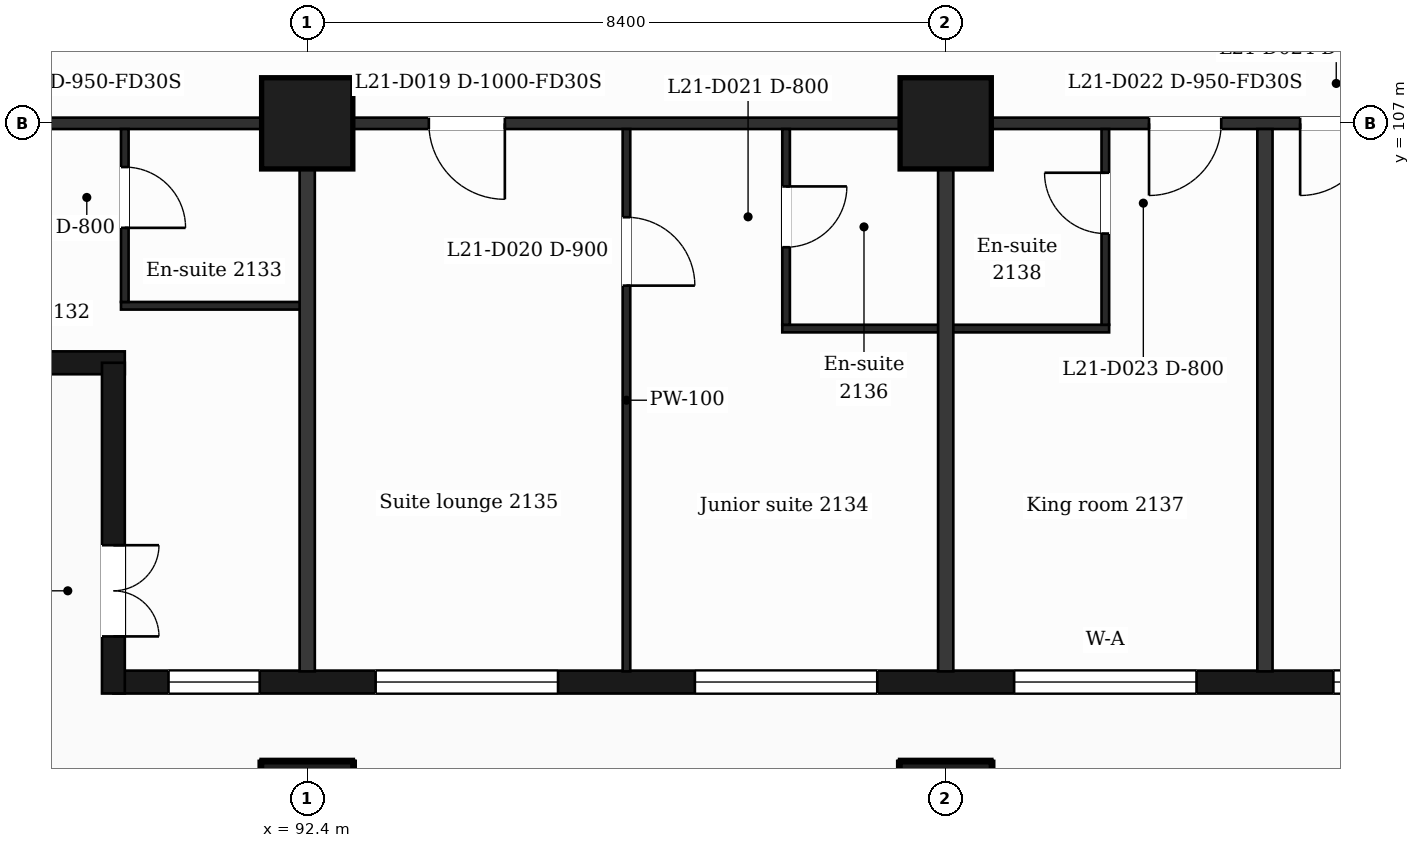
"""IFC4 building model, lengths in metres.
Left out: names, types, materials, properties, quantities, classifications, styles, units other than length and angle.
Written with IfcOpenShell. Run it as: python <this file> out.ifc"""

import sys

from ifc_helpers import new_model, si_unit, direction, frame, frame_2d, origin, origin_2d, place, context, subcontext, project, spatial, rectangle, extrude, element, fill, save


model = new_model("IFC4")
c1 = context("Model", 3, precision=1e-05, world=origin(), true_north=direction((0.0, 1.0)))
c2 = subcontext(c1, "Body", "Model", "MODEL_VIEW")
j1 = project(units=[si_unit("LENGTHUNIT", "METRE"), si_unit("PLANEANGLEUNIT", "RADIAN")], contexts=[c1])
p1 = place(None, origin())
s1 = spatial("IfcSite", under=j1, at=p1, CompositionType="ELEMENT")
p2 = place(p1, origin())
s2 = spatial("IfcBuilding", under=s1, at=p2, CompositionType="ELEMENT")
p3 = place(p2, frame((0.0, 0.0, 94.7)))
s3 = spatial("IfcBuildingStorey", under=s2, at=p3, CompositionType="ELEMENT", Elevation=94.7)
for number, where, z_axis, x_axis in (
    (1, (92.4, 98.0, 0.0), (0.0, 0.0, 1.0), (1.0, 0.0, 0.0)),
    (2, (100.8, 98.0, 0.0), (0.0, 0.0, 1.0), (1.0, 0.0, 0.0)),
    (3, (92.4, 107.0, 0.0), (0.0, 0.0, 1.0), (1.0, 0.0, 0.0)),
    (4, (100.8, 107.0, 0.0), (0.0, 0.0, 1.0), (1.0, 0.0, 0.0)),
):
    element("IfcColumn", number, at=place(p3, frame(where, z_axis=z_axis, x_axis=x_axis)), inside=s3, PredefinedType="COLUMN", context=c2, shape_type="SweptSolid", body=[
        extrude(rectangle(XDim=1.2, YDim=1.2, at=origin_2d()), origin(), (0.0, 0.0, 1.0), 3.7),
    ])
p4 = place(p3, frame((89.85, 99.65, 0.0), z_axis=(0.0, 0.0, 1.0), x_axis=(1.0, 0.0, 0.0)))
e5 = element("IfcWall", 5, at=p4, inside=s3, PredefinedType="SOLIDWALL", context=c2, shape_type="SweptSolid", body=[
    extrude(rectangle(XDim=47.25, YDim=0.3, at=frame_2d((23.625, 0.0))), origin(), (0.0, 0.0, 1.0), 3.38),
])
p5 = place(p4, frame((0.725, 0.0, 0.9)))
e6 = element("IfcOpeningElement", 6, at=p5, cuts=e5, PredefinedType="OPENING", context=c2, shape_type="SweptSolid", body=[
    extrude(rectangle(XDim=1.2, YDim=2.1, at=frame_2d((0.6, 1.05))), frame((0.0, 0.16, 0.0), z_axis=(0.0, -1.0, 0.0), x_axis=(1.0, 0.0, 0.0)), (0.0, 0.0, 1.0), 0.32),
])
p6 = place(p4, frame((3.45, 0.0, 0.9)))
e7 = element("IfcOpeningElement", 7, at=p6, cuts=e5, PredefinedType="OPENING", context=c2, shape_type="SweptSolid", body=[
    extrude(rectangle(XDim=2.4, YDim=2.1, at=frame_2d((1.2, 1.05))), frame((0.0, 0.16, 0.0), z_axis=(0.0, -1.0, 0.0), x_axis=(1.0, 0.0, 0.0)), (0.0, 0.0, 1.0), 0.32),
])
p7 = place(p4, frame((7.65, 0.0, 0.9)))
e8 = element("IfcOpeningElement", 8, at=p7, cuts=e5, PredefinedType="OPENING", context=c2, shape_type="SweptSolid", body=[
    extrude(rectangle(XDim=2.4, YDim=2.1, at=frame_2d((1.2, 1.05))), frame((0.0, 0.16, 0.0), z_axis=(0.0, -1.0, 0.0), x_axis=(1.0, 0.0, 0.0)), (0.0, 0.0, 1.0), 0.32),
])
p8 = place(p4, frame((11.85, 0.0, 0.9)))
e9 = element("IfcOpeningElement", 9, at=p8, cuts=e5, PredefinedType="OPENING", context=c2, shape_type="SweptSolid", body=[
    extrude(rectangle(XDim=2.4, YDim=2.1, at=frame_2d((1.2, 1.05))), frame((0.0, 0.16, 0.0), z_axis=(0.0, -1.0, 0.0), x_axis=(1.0, 0.0, 0.0)), (0.0, 0.0, 1.0), 0.32),
])
p9 = place(p4, frame((16.05, 0.0, 0.9)))
e10 = element("IfcOpeningElement", 10, at=p9, cuts=e5, PredefinedType="OPENING", context=c2, shape_type="SweptSolid", body=[
    extrude(rectangle(XDim=2.4, YDim=2.1, at=frame_2d((1.2, 1.05))), frame((0.0, 0.16, 0.0), z_axis=(0.0, -1.0, 0.0), x_axis=(1.0, 0.0, 0.0)), (0.0, 0.0, 1.0), 0.32),
])
p10 = place(p4, frame((20.25, 0.0, 0.9)))
e11 = element("IfcOpeningElement", 11, at=p10, cuts=e5, PredefinedType="OPENING", context=c2, shape_type="SweptSolid", body=[
    extrude(rectangle(XDim=2.4, YDim=2.1, at=frame_2d((1.2, 1.05))), frame((0.0, 0.16, 0.0), z_axis=(0.0, -1.0, 0.0), x_axis=(1.0, 0.0, 0.0)), (0.0, 0.0, 1.0), 0.32),
])
p11 = place(p4, frame((25.05, 0.0, 0.9)))
e12 = element("IfcOpeningElement", 12, at=p11, cuts=e5, PredefinedType="OPENING", context=c2, shape_type="SweptSolid", body=[
    extrude(rectangle(XDim=1.2, YDim=2.1, at=frame_2d((0.6, 1.05))), frame((0.0, 0.16, 0.0), z_axis=(0.0, -1.0, 0.0), x_axis=(1.0, 0.0, 0.0)), (0.0, 0.0, 1.0), 0.32),
])
p12 = place(p4, frame((29.25, 0.0, 0.9)))
e13 = element("IfcOpeningElement", 13, at=p12, cuts=e5, PredefinedType="OPENING", context=c2, shape_type="SweptSolid", body=[
    extrude(rectangle(XDim=1.2, YDim=2.1, at=frame_2d((0.6, 1.05))), frame((0.0, 0.16, 0.0), z_axis=(0.0, -1.0, 0.0), x_axis=(1.0, 0.0, 0.0)), (0.0, 0.0, 1.0), 0.32),
])
p13 = place(p4, frame((32.55, 0.0, 0.0)))
e14 = element("IfcOpeningElement", 14, at=p13, cuts=e5, PredefinedType="OPENING", context=c2, shape_type="SweptSolid", body=[
    extrude(rectangle(XDim=1.2, YDim=2.4, at=frame_2d((0.6, 1.2))), frame((0.0, 0.16, 0.0), z_axis=(0.0, -1.0, 0.0), x_axis=(1.0, 0.0, 0.0)), (0.0, 0.0, 1.0), 0.32),
])
p14 = place(p4, frame((34.35, 0.0, 0.9)))
e15 = element("IfcOpeningElement", 15, at=p14, cuts=e5, PredefinedType="OPENING", context=c2, shape_type="SweptSolid", body=[
    extrude(rectangle(XDim=1.2, YDim=2.1, at=frame_2d((0.6, 1.05))), frame((0.0, 0.16, 0.0), z_axis=(0.0, -1.0, 0.0), x_axis=(1.0, 0.0, 0.0)), (0.0, 0.0, 1.0), 0.32),
])
p15 = place(p4, frame((37.05, 0.0, 0.9)))
e16 = element("IfcOpeningElement", 16, at=p15, cuts=e5, PredefinedType="OPENING", context=c2, shape_type="SweptSolid", body=[
    extrude(rectangle(XDim=2.4, YDim=2.1, at=frame_2d((1.2, 1.05))), frame((0.0, 0.16, 0.0), z_axis=(0.0, -1.0, 0.0), x_axis=(1.0, 0.0, 0.0)), (0.0, 0.0, 1.0), 0.32),
])
p16 = place(p4, frame((40.95, 0.0, 0.0)))
e17 = element("IfcOpeningElement", 17, at=p16, cuts=e5, PredefinedType="OPENING", context=c2, shape_type="SweptSolid", body=[
    extrude(rectangle(XDim=1.2, YDim=2.4, at=frame_2d((0.6, 1.2))), frame((0.0, 0.16, 0.0), z_axis=(0.0, -1.0, 0.0), x_axis=(1.0, 0.0, 0.0)), (0.0, 0.0, 1.0), 0.32),
])
p17 = place(p4, frame((42.75, 0.0, 0.9)))
e18 = element("IfcOpeningElement", 18, at=p17, cuts=e5, PredefinedType="OPENING", context=c2, shape_type="SweptSolid", body=[
    extrude(rectangle(XDim=1.2, YDim=2.1, at=frame_2d((0.6, 1.05))), frame((0.0, 0.16, 0.0), z_axis=(0.0, -1.0, 0.0), x_axis=(1.0, 0.0, 0.0)), (0.0, 0.0, 1.0), 0.32),
])
p18 = place(p4, frame((45.25, 0.0, 0.9)))
e19 = element("IfcOpeningElement", 19, at=p18, cuts=e5, PredefinedType="OPENING", context=c2, shape_type="SweptSolid", body=[
    extrude(rectangle(XDim=1.2, YDim=2.1, at=frame_2d((0.6, 1.05))), frame((0.0, 0.16, 0.0), z_axis=(0.0, -1.0, 0.0), x_axis=(1.0, 0.0, 0.0)), (0.0, 0.0, 1.0), 0.32),
])
p19 = place(p3, frame((86.452, 103.85, 0.0), z_axis=(0.0, 0.0, 1.0), x_axis=(1.0, 0.0, 0.0)))
e20 = element("IfcWall", 20, at=p19, inside=s3, PredefinedType="SOLIDWALL", context=c2, shape_type="SweptSolid", body=[
    extrude(rectangle(XDim=3.548, YDim=0.3, at=frame_2d((1.774, 0.0))), origin(), (0.0, 0.0, 1.0), 3.38),
])
p20 = place(p3, frame((89.85, 103.85, 0.0), z_axis=(0.0, 0.0, 1.0), x_axis=(0.0, -1.0, 0.0)))
e21 = element("IfcWall", 21, at=p20, inside=s3, PredefinedType="SOLIDWALL", context=c2, shape_type="SweptSolid", body=[
    extrude(rectangle(XDim=4.35, YDim=0.3, at=frame_2d((2.175, 0.0))), origin(), (0.0, 0.0, 1.0), 3.38),
])
p21 = place(p20, frame((2.4, 0.0, 0.0)))
e22 = element("IfcOpeningElement", 22, at=p21, cuts=e21, PredefinedType="OPENING", context=c2, shape_type="SweptSolid", body=[
    extrude(rectangle(XDim=1.2, YDim=2.4, at=frame_2d((0.6, 1.2))), frame((0.0, 0.16, 0.0), z_axis=(0.0, -1.0, 0.0), x_axis=(1.0, 0.0, 0.0)), (0.0, 0.0, 1.0), 0.32),
])
p22 = place(p3, frame((98.65, 104.3, 0.0), z_axis=(0.0, 0.0, 1.0), x_axis=(1.0, 0.0, 0.0)))
e23 = element("IfcWall", 23, at=p22, inside=s3, PredefinedType="PARTITIONING", context=c2, shape_type="SweptSolid", body=[
    extrude(rectangle(XDim=4.3, YDim=0.1, at=frame_2d((2.15, 0.0))), origin(), (0.0, 0.0, 1.0), 3.38),
])
p23 = place(p3, frame((89.95, 104.6, 0.0), z_axis=(0.0, 0.0, 1.0), x_axis=(1.0, 0.0, 0.0)))
e24 = element("IfcWall", 24, at=p23, inside=s3, PredefinedType="PARTITIONING", context=c2, shape_type="SweptSolid", body=[
    extrude(rectangle(XDim=2.45, YDim=0.1, at=frame_2d((1.225, 0.0))), origin(), (0.0, 0.0, 1.0), 3.38),
])
p24 = place(p3, frame((87.018, 107.0, 0.0), z_axis=(0.0, 0.0, 1.0), x_axis=(1.0, 0.0, 0.0)))
e25 = element("IfcWall", 25, at=p24, inside=s3, PredefinedType="PARTITIONING", context=c2, shape_type="SweptSolid", body=[
    extrude(rectangle(XDim=52.765, YDim=0.15, at=frame_2d((26.382, 0.0))), origin(), (0.0, 0.0, 1.0), 3.38),
])
p25 = place(p24, frame((0.707, 0.0, 0.0)))
e26 = element("IfcOpeningElement", 26, at=p25, cuts=e25, PredefinedType="OPENING", context=c2, shape_type="SweptSolid", body=[
    extrude(rectangle(XDim=0.95, YDim=2.1, at=frame_2d((0.475, 1.05))), frame((0.0, 0.085, 0.0), z_axis=(0.0, -1.0, 0.0), x_axis=(1.0, 0.0, 0.0)), (0.0, 0.0, 1.0), 0.17),
])
p26 = place(p24, frame((6.982, 0.0, 0.0)))
e27 = element("IfcOpeningElement", 27, at=p26, cuts=e25, PredefinedType="OPENING", context=c2, shape_type="SweptSolid", body=[
    extrude(rectangle(XDim=1.0, YDim=2.1, at=frame_2d((0.5, 1.05))), frame((0.0, 0.085, 0.0), z_axis=(0.0, -1.0, 0.0), x_axis=(1.0, 0.0, 0.0)), (0.0, 0.0, 1.0), 0.17),
])
p27 = place(p24, frame((16.457, 0.0, 0.0)))
e28 = element("IfcOpeningElement", 28, at=p27, cuts=e25, PredefinedType="OPENING", context=c2, shape_type="SweptSolid", body=[
    extrude(rectangle(XDim=0.95, YDim=2.1, at=frame_2d((0.475, 1.05))), frame((0.0, 0.085, 0.0), z_axis=(0.0, -1.0, 0.0), x_axis=(1.0, 0.0, 0.0)), (0.0, 0.0, 1.0), 0.17),
])
p28 = place(p24, frame((18.445, 0.0, 0.0)))
e29 = element("IfcOpeningElement", 29, at=p28, cuts=e25, PredefinedType="OPENING", context=c2, shape_type="SweptSolid", body=[
    extrude(rectangle(XDim=0.95, YDim=2.1, at=frame_2d((0.475, 1.05))), frame((0.0, 0.085, 0.0), z_axis=(0.0, -1.0, 0.0), x_axis=(1.0, 0.0, 0.0)), (0.0, 0.0, 1.0), 0.17),
])
p29 = place(p24, frame((25.157, 0.0, 0.0)))
e30 = element("IfcOpeningElement", 30, at=p29, cuts=e25, PredefinedType="OPENING", context=c2, shape_type="SweptSolid", body=[
    extrude(rectangle(XDim=0.95, YDim=2.1, at=frame_2d((0.475, 1.05))), frame((0.0, 0.085, 0.0), z_axis=(0.0, -1.0, 0.0), x_axis=(1.0, 0.0, 0.0)), (0.0, 0.0, 1.0), 0.17),
])
p30 = place(p24, frame((27.07, 0.0, 0.0)))
e31 = element("IfcOpeningElement", 31, at=p30, cuts=e25, PredefinedType="OPENING", context=c2, shape_type="SweptSolid", body=[
    extrude(rectangle(XDim=0.95, YDim=2.1, at=frame_2d((0.475, 1.05))), frame((0.0, 0.085, 0.0), z_axis=(0.0, -1.0, 0.0), x_axis=(1.0, 0.0, 0.0)), (0.0, 0.0, 1.0), 0.17),
])
p31 = place(p24, frame((34.712, 0.0, 0.0)))
e32 = element("IfcOpeningElement", 32, at=p31, cuts=e25, PredefinedType="OPENING", context=c2, shape_type="SweptSolid", body=[
    extrude(rectangle(XDim=0.95, YDim=2.1, at=frame_2d((0.475, 1.05))), frame((0.0, 0.085, 0.0), z_axis=(0.0, -1.0, 0.0), x_axis=(1.0, 0.0, 0.0)), (0.0, 0.0, 1.0), 0.17),
])
p32 = place(p24, frame((39.807, 0.0, 0.0)))
e33 = element("IfcOpeningElement", 33, at=p32, cuts=e25, PredefinedType="OPENING", context=c2, shape_type="SweptSolid", body=[
    extrude(rectangle(XDim=0.95, YDim=2.1, at=frame_2d((0.475, 1.05))), frame((0.0, 0.085, 0.0), z_axis=(0.0, -1.0, 0.0), x_axis=(1.0, 0.0, 0.0)), (0.0, 0.0, 1.0), 0.17),
])
p33 = place(p24, frame((45.622, 0.0, 0.0)))
e34 = element("IfcOpeningElement", 34, at=p33, cuts=e25, PredefinedType="OPENING", context=c2, shape_type="SweptSolid", body=[
    extrude(rectangle(XDim=0.95, YDim=2.1, at=frame_2d((0.475, 1.05))), frame((0.0, 0.085, 0.0), z_axis=(0.0, -1.0, 0.0), x_axis=(1.0, 0.0, 0.0)), (0.0, 0.0, 1.0), 0.17),
])
p34 = place(p24, frame((48.974, 0.0, 0.0)))
e35 = element("IfcOpeningElement", 35, at=p34, cuts=e25, PredefinedType="OPENING", context=c2, shape_type="SweptSolid", body=[
    extrude(rectangle(XDim=0.95, YDim=2.1, at=frame_2d((0.475, 1.05))), frame((0.0, 0.085, 0.0), z_axis=(0.0, -1.0, 0.0), x_axis=(1.0, 0.0, 0.0)), (0.0, 0.0, 1.0), 0.17),
])
p35 = place(p3, frame((90.0, 104.65, 0.0), z_axis=(0.0, 0.0, 1.0), x_axis=(0.0, 1.0, 0.0)))
e36 = element("IfcWall", 36, at=p35, inside=s3, PredefinedType="PARTITIONING", context=c2, shape_type="SweptSolid", body=[
    extrude(rectangle(XDim=2.275, YDim=0.1, at=frame_2d((1.138, 0.0))), origin(), (0.0, 0.0, 1.0), 3.38),
])
p36 = place(p35, frame((0.975, 0.0, 0.0)))
e37 = element("IfcOpeningElement", 37, at=p36, cuts=e36, PredefinedType="OPENING", context=c2, shape_type="SweptSolid", body=[
    extrude(rectangle(XDim=0.8, YDim=2.1, at=frame_2d((0.4, 1.05))), frame((0.0, 0.06, 0.0), z_axis=(0.0, -1.0, 0.0), x_axis=(1.0, 0.0, 0.0)), (0.0, 0.0, 1.0), 0.12),
])
p37 = place(p3, frame((92.4, 99.79, 0.0), z_axis=(0.0, 0.0, 1.0), x_axis=(0.0, 1.0, 0.0)))
e38 = element("IfcWall", 38, at=p37, inside=s3, PredefinedType="PARTITIONING", context=c2, shape_type="SweptSolid", body=[
    extrude(rectangle(XDim=7.135, YDim=0.2, at=frame_2d((3.567, 0.0))), origin(), (0.0, 0.0, 1.0), 3.38),
])
p38 = place(p3, frame((96.6, 99.79, 0.0), z_axis=(0.0, 0.0, 1.0), x_axis=(0.0, 1.0, 0.0)))
e39 = element("IfcWall", 39, at=p38, inside=s3, PredefinedType="PARTITIONING", context=c2, shape_type="SweptSolid", body=[
    extrude(rectangle(XDim=7.135, YDim=0.1, at=frame_2d((3.567, 0.0))), origin(), (0.0, 0.0, 1.0), 3.38),
])
p39 = place(p38, frame((5.075, 0.0, 0.0)))
e40 = element("IfcOpeningElement", 40, at=p39, cuts=e39, PredefinedType="OPENING", context=c2, shape_type="SweptSolid", body=[
    extrude(rectangle(XDim=0.9, YDim=2.1, at=frame_2d((0.45, 1.05))), frame((0.0, 0.06, 0.0), z_axis=(0.0, -1.0, 0.0), x_axis=(1.0, 0.0, 0.0)), (0.0, 0.0, 1.0), 0.12),
])
p40 = place(p3, frame((98.7, 104.35, 0.0), z_axis=(0.0, 0.0, 1.0), x_axis=(0.0, 1.0, 0.0)))
e41 = element("IfcWall", 41, at=p40, inside=s3, PredefinedType="PARTITIONING", context=c2, shape_type="SweptSolid", body=[
    extrude(rectangle(XDim=2.575, YDim=0.1, at=frame_2d((1.288, 0.0))), origin(), (0.0, 0.0, 1.0), 3.38),
])
p41 = place(p40, frame((1.02, 0.0, 0.0)))
e42 = element("IfcOpeningElement", 42, at=p41, cuts=e41, PredefinedType="OPENING", context=c2, shape_type="SweptSolid", body=[
    extrude(rectangle(XDim=0.8, YDim=2.1, at=frame_2d((0.4, 1.05))), frame((0.0, 0.06, 0.0), z_axis=(0.0, -1.0, 0.0), x_axis=(1.0, 0.0, 0.0)), (0.0, 0.0, 1.0), 0.12),
])
p42 = place(p3, frame((100.8, 99.79, 0.0), z_axis=(0.0, 0.0, 1.0), x_axis=(0.0, 1.0, 0.0)))
e43 = element("IfcWall", 43, at=p42, inside=s3, PredefinedType="PARTITIONING", context=c2, shape_type="SweptSolid", body=[
    extrude(rectangle(XDim=7.135, YDim=0.2, at=frame_2d((3.567, 0.0))), origin(), (0.0, 0.0, 1.0), 3.38),
])
p43 = place(p3, frame((102.9, 104.35, 0.0), z_axis=(0.0, 0.0, 1.0), x_axis=(0.0, 1.0, 0.0)))
e44 = element("IfcWall", 44, at=p43, inside=s3, PredefinedType="PARTITIONING", context=c2, shape_type="SweptSolid", body=[
    extrude(rectangle(XDim=2.575, YDim=0.1, at=frame_2d((1.288, 0.0))), origin(), (0.0, 0.0, 1.0), 3.38),
])
p44 = place(p43, frame((1.2, 0.0, 0.0)))
e45 = element("IfcOpeningElement", 45, at=p44, cuts=e44, PredefinedType="OPENING", context=c2, shape_type="SweptSolid", body=[
    extrude(rectangle(XDim=0.8, YDim=2.1, at=frame_2d((0.4, 1.05))), frame((0.0, 0.06, 0.0), z_axis=(0.0, -1.0, 0.0), x_axis=(1.0, 0.0, 0.0)), (0.0, 0.0, 1.0), 0.12),
])
p45 = place(p3, frame((105.0, 99.79, 0.0), z_axis=(0.0, 0.0, 1.0), x_axis=(0.0, 1.0, 0.0)))
e46 = element("IfcWall", 46, at=p45, inside=s3, PredefinedType="PARTITIONING", context=c2, shape_type="SweptSolid", body=[
    extrude(rectangle(XDim=7.135, YDim=0.2, at=frame_2d((3.567, 0.0))), origin(), (0.0, 0.0, 1.0), 3.38),
])
p46 = place(p5, origin())
e47 = element("IfcWindow", 47, at=p46, inside=s3, PartitioningType="SINGLE_PANEL", PredefinedType="WINDOW", context=c2, shape_type="SweptSolid", body=[
    extrude(rectangle(XDim=1.2, YDim=2.1, at=frame_2d((0.6, 1.05))), frame((0.0, 0.03, 0.0), z_axis=(0.0, -1.0, 0.0), x_axis=(1.0, 0.0, 0.0)), (0.0, 0.0, 1.0), 0.06),
])
fill(e6, e47)
p47 = place(p6, origin())
e48 = element("IfcWindow", 48, at=p47, inside=s3, PartitioningType="SINGLE_PANEL", PredefinedType="WINDOW", context=c2, shape_type="SweptSolid", body=[
    extrude(rectangle(XDim=2.4, YDim=2.1, at=frame_2d((1.2, 1.05))), frame((0.0, 0.03, 0.0), z_axis=(0.0, -1.0, 0.0), x_axis=(1.0, 0.0, 0.0)), (0.0, 0.0, 1.0), 0.06),
])
fill(e7, e48)
p48 = place(p7, origin())
e49 = element("IfcWindow", 49, at=p48, inside=s3, PartitioningType="SINGLE_PANEL", PredefinedType="WINDOW", context=c2, shape_type="SweptSolid", body=[
    extrude(rectangle(XDim=2.4, YDim=2.1, at=frame_2d((1.2, 1.05))), frame((0.0, 0.03, 0.0), z_axis=(0.0, -1.0, 0.0), x_axis=(1.0, 0.0, 0.0)), (0.0, 0.0, 1.0), 0.06),
])
fill(e8, e49)
p49 = place(p8, origin())
e50 = element("IfcWindow", 50, at=p49, inside=s3, PartitioningType="SINGLE_PANEL", PredefinedType="WINDOW", context=c2, shape_type="SweptSolid", body=[
    extrude(rectangle(XDim=2.4, YDim=2.1, at=frame_2d((1.2, 1.05))), frame((0.0, 0.03, 0.0), z_axis=(0.0, -1.0, 0.0), x_axis=(1.0, 0.0, 0.0)), (0.0, 0.0, 1.0), 0.06),
])
fill(e9, e50)
p50 = place(p9, origin())
e51 = element("IfcWindow", 51, at=p50, inside=s3, PartitioningType="SINGLE_PANEL", PredefinedType="WINDOW", context=c2, shape_type="SweptSolid", body=[
    extrude(rectangle(XDim=2.4, YDim=2.1, at=frame_2d((1.2, 1.05))), frame((0.0, 0.03, 0.0), z_axis=(0.0, -1.0, 0.0), x_axis=(1.0, 0.0, 0.0)), (0.0, 0.0, 1.0), 0.06),
])
fill(e10, e51)
p51 = place(p21, origin())
e52 = element("IfcDoor", 52, at=p51, inside=s3, OperationType="DOUBLE_DOOR_SINGLE_SWING", PredefinedType="DOOR", context=c2, shape_type="SweptSolid", body=[
    extrude(rectangle(XDim=1.2, YDim=2.4, at=frame_2d((0.6, 1.2))), frame((0.0, 0.025, 0.0), z_axis=(0.0, -1.0, 0.0), x_axis=(1.0, 0.0, 0.0)), (0.0, 0.0, 1.0), 0.05),
])
fill(e22, e52)
p52 = place(p36, origin())
e53 = element("IfcDoor", 53, at=p52, inside=s3, OperationType="SINGLE_SWING_LEFT", PredefinedType="DOOR", context=c2, shape_type="SweptSolid", body=[
    extrude(rectangle(XDim=0.8, YDim=2.1, at=frame_2d((0.4, 1.05))), frame((0.0, 0.025, 0.0), z_axis=(0.0, -1.0, 0.0), x_axis=(1.0, 0.0, 0.0)), (0.0, 0.0, 1.0), 0.05),
])
fill(e37, e53)
p53 = place(p26, origin())
e54 = element("IfcDoor", 54, at=p53, inside=s3, OperationType="SINGLE_SWING_RIGHT", PredefinedType="DOOR", context=c2, shape_type="SweptSolid", body=[
    extrude(rectangle(XDim=1.0, YDim=2.1, at=frame_2d((0.5, 1.05))), frame((0.0, 0.025, 0.0), z_axis=(0.0, -1.0, 0.0), x_axis=(1.0, 0.0, 0.0)), (0.0, 0.0, 1.0), 0.05),
])
fill(e27, e54)
p54 = place(p39, origin())
e55 = element("IfcDoor", 55, at=p54, inside=s3, OperationType="SINGLE_SWING_LEFT", PredefinedType="DOOR", context=c2, shape_type="SweptSolid", body=[
    extrude(rectangle(XDim=0.9, YDim=2.1, at=frame_2d((0.45, 1.05))), frame((0.0, 0.025, 0.0), z_axis=(0.0, -1.0, 0.0), x_axis=(1.0, 0.0, 0.0)), (0.0, 0.0, 1.0), 0.05),
])
fill(e40, e55)
p55 = place(p41, origin())
e56 = element("IfcDoor", 56, at=p55, inside=s3, OperationType="SINGLE_SWING_RIGHT", PredefinedType="DOOR", context=c2, shape_type="SweptSolid", body=[
    extrude(rectangle(XDim=0.8, YDim=2.1, at=frame_2d((0.4, 1.05))), frame((0.0, 0.025, 0.0), z_axis=(0.0, -1.0, 0.0), x_axis=(1.0, 0.0, 0.0)), (0.0, 0.0, 1.0), 0.05),
])
fill(e42, e56)
p56 = place(p27, origin())
e57 = element("IfcDoor", 57, at=p56, inside=s3, OperationType="SINGLE_SWING_LEFT", PredefinedType="DOOR", context=c2, shape_type="SweptSolid", body=[
    extrude(rectangle(XDim=0.95, YDim=2.1, at=frame_2d((0.475, 1.05))), frame((0.0, 0.025, 0.0), z_axis=(0.0, -1.0, 0.0), x_axis=(1.0, 0.0, 0.0)), (0.0, 0.0, 1.0), 0.05),
])
fill(e28, e57)
p57 = place(p44, origin())
e58 = element("IfcDoor", 58, at=p57, inside=s3, OperationType="SINGLE_SWING_RIGHT", PredefinedType="DOOR", context=c2, shape_type="SweptSolid", body=[
    extrude(rectangle(XDim=0.8, YDim=2.1, at=frame_2d((0.4, 1.05))), frame((0.0, 0.025, 0.0), z_axis=(0.0, -1.0, 0.0), x_axis=(1.0, 0.0, 0.0)), (0.0, 0.0, 1.0), 0.05),
])
fill(e45, e58)
p58 = place(p28, origin())
e59 = element("IfcDoor", 59, at=p58, inside=s3, OperationType="SINGLE_SWING_LEFT", PredefinedType="DOOR", context=c2, shape_type="SweptSolid", body=[
    extrude(rectangle(XDim=0.95, YDim=2.1, at=frame_2d((0.475, 1.05))), frame((0.0, 0.025, 0.0), z_axis=(0.0, -1.0, 0.0), x_axis=(1.0, 0.0, 0.0)), (0.0, 0.0, 1.0), 0.05),
])
fill(e29, e59)
save(model, sys.argv[1])
